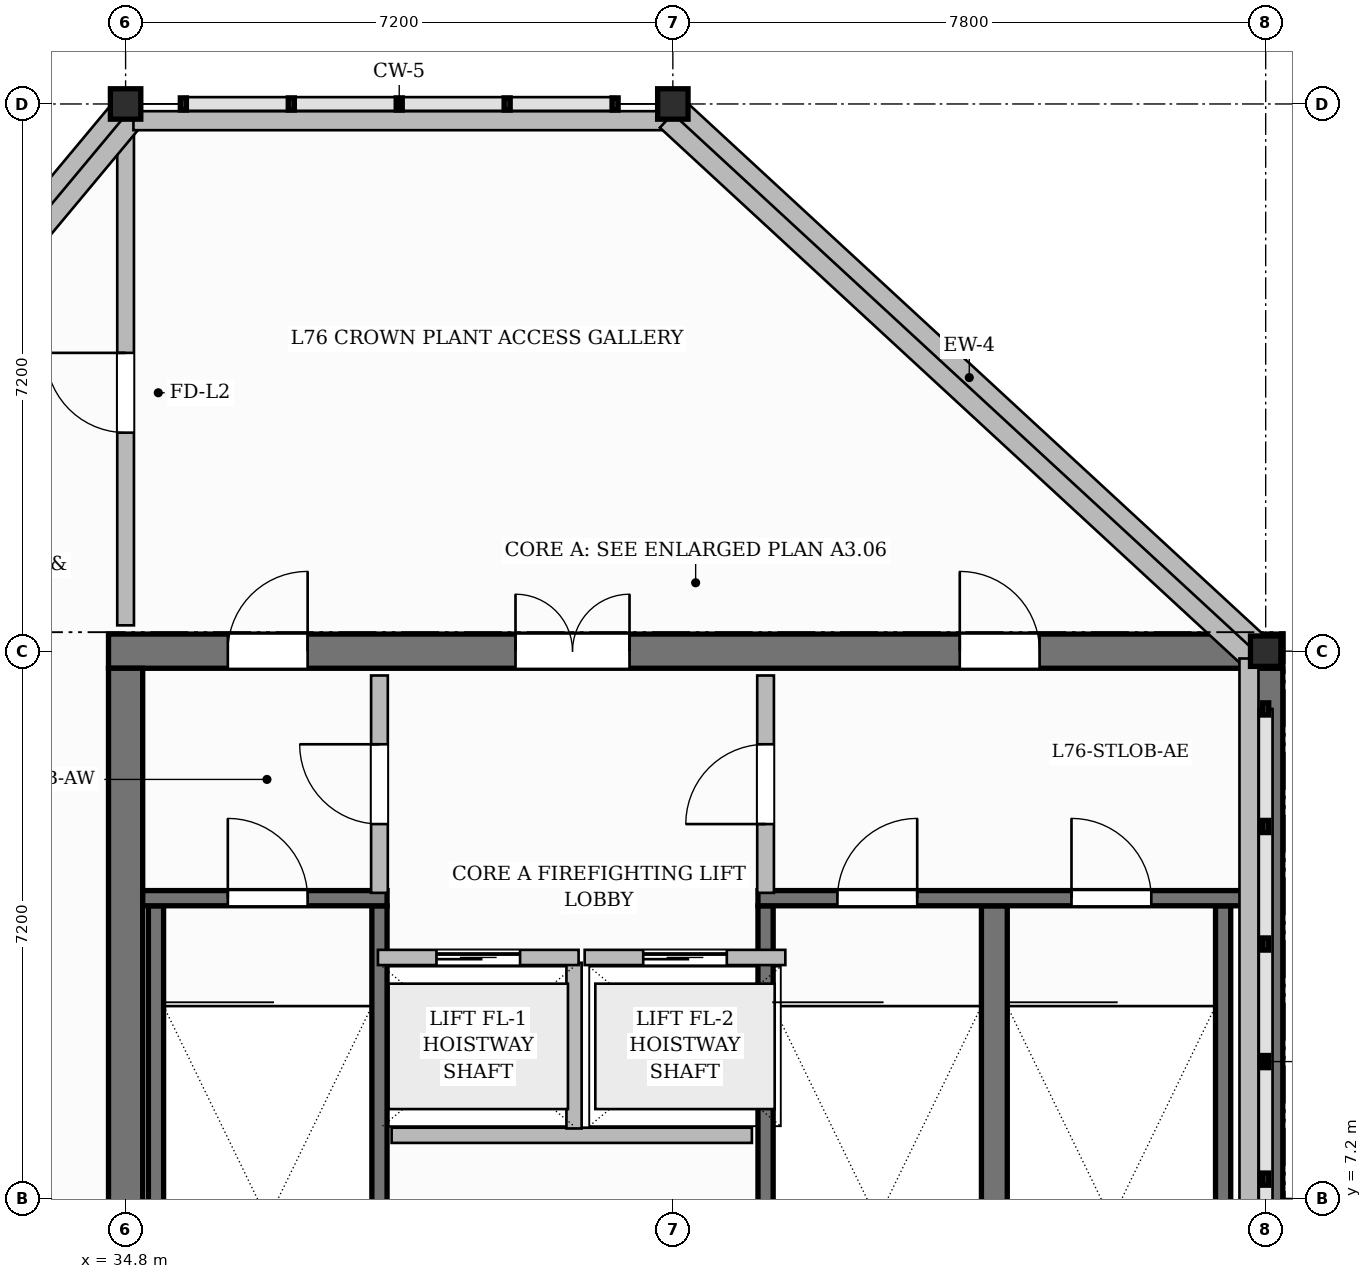
"""IFC4 building model, lengths in metres.
Left out: names, types, materials, properties, quantities, classifications, styles, units other than length and angle.
Written with IfcOpenShell. Run it as: python <this file> out.ifc"""

import sys

from ifc_helpers import new_model, si_unit, direction, frame, frame_2d, origin, origin_2d, place, context, subcontext, project, spatial, rectangle, hollow_rectangle, extrude, source, transform, mapped, element, fill, save


model = new_model("IFC4")
c1 = context("Model", 3, precision=1e-05, world=origin(), true_north=direction((0.0, 1.0)))
c2 = subcontext(c1, "Body", "Model", "MODEL_VIEW")
j1 = project(units=[si_unit("LENGTHUNIT", "METRE"), si_unit("PLANEANGLEUNIT", "RADIAN")], contexts=[c1])
p1 = place(None, origin())
s1 = spatial("IfcSite", under=j1, at=p1, CompositionType="ELEMENT")
p2 = place(p1, origin())
s2 = spatial("IfcBuilding", under=s1, at=p2, CompositionType="ELEMENT")
p3 = place(p2, frame((0.0, 0.0, 303.9)))
s3 = spatial("IfcBuildingStorey", under=s2, at=p3, CompositionType="ELEMENT", Elevation=303.9)
p4 = place(p3, frame((34.575, 14.4, 0.0), z_axis=(0.0, 0.0, 1.0), x_axis=(1.0, 0.0, 0.0)))
e1 = element("IfcWall", 1, at=p4, inside=s3, PredefinedType="SHEAR", context=c2, shape_type="SweptSolid", body=[
    extrude(rectangle(XDim=15.45, YDim=0.45, at=frame_2d((7.725, 0.0))), origin(), (0.0, 0.0, 1.0), 4.8),
])
p5 = place(p4, frame((5.355, 0.0, 0.0)))
e2 = element("IfcOpeningElement", 2, at=p5, cuts=e1, PredefinedType="OPENING", context=c2, shape_type="SweptSolid", body=[
    extrude(rectangle(XDim=1.5, YDim=2.2, at=frame_2d((0.75, 1.1))), frame((0.0, 0.235, 0.0), z_axis=(0.0, -1.0, 0.0), x_axis=(1.0, 0.0, 0.0)), (0.0, 0.0, 1.0), 0.47),
])
p6 = place(p4, frame((1.57, 0.0, 0.0)))
e3 = element("IfcOpeningElement", 3, at=p6, cuts=e1, PredefinedType="OPENING", context=c2, shape_type="SweptSolid", body=[
    extrude(rectangle(XDim=1.05, YDim=2.15, at=frame_2d((0.525, 1.075))), frame((0.0, 0.235, 0.0), z_axis=(0.0, -1.0, 0.0), x_axis=(1.0, 0.0, 0.0)), (0.0, 0.0, 1.0), 0.47),
])
p7 = place(p4, frame((11.2, 0.0, 0.0)))
e4 = element("IfcOpeningElement", 4, at=p7, cuts=e1, PredefinedType="OPENING", context=c2, shape_type="SweptSolid", body=[
    extrude(rectangle(XDim=1.05, YDim=2.15, at=frame_2d((0.525, 1.075))), frame((0.0, 0.235, 0.0), z_axis=(0.0, -1.0, 0.0), x_axis=(1.0, 0.0, 0.0)), (0.0, 0.0, 1.0), 0.47),
])
for number, where, z_axis, x_axis in (
    (5, (34.8, 3.825, 0.0), (0.0, 0.0, 1.0), (0.0, 1.0, 0.0)),
    (6, (49.8, 3.825, 0.0), (0.0, 0.0, 1.0), (0.0, 1.0, 0.0)),
):
    element("IfcWall", number, at=place(p3, frame(where, z_axis=z_axis, x_axis=x_axis)), inside=s3, PredefinedType="SHEAR", context=c2, shape_type="SweptSolid", body=[
        extrude(rectangle(XDim=10.35, YDim=0.45, at=frame_2d((5.175, 0.0))), origin(), (0.0, 0.0, 1.0), 4.8),
    ])
m1 = source(origin(), c2, "Body", "SweptSolid", [
    extrude(hollow_rectangle(XDim=0.4, YDim=0.4, WallThickness=0.02, at=origin_2d()), origin(), (0.0, 0.0, 1.0), 4.8),
])
for number, where, z_axis, x_axis in (
    (7, (49.8, 14.4, 0.0), (0.0, 0.0, 1.0), (1.0, 0.0, 0.0)),
    (8, (42.0, 21.6, 0.0), (0.0, 0.0, 1.0), (1.0, 0.0, 0.0)),
    (9, (34.8, 21.6, 0.0), (0.0, 0.0, 1.0), (1.0, 0.0, 0.0)),
):
    element("IfcColumn", number, at=place(p3, frame(where, z_axis=z_axis, x_axis=x_axis)), inside=s3, PredefinedType="COLUMN", context=c2, shape_type="MappedRepresentation", body=[
        mapped(m1, transform((0.0, 0.0, 0.0), scale=1.0)),
    ])
for number, where, z_axis, x_axis in (
    (10, (35.2, 4.1, 0.0), (0.0, 0.0, 1.0), (0.0, 1.0, 0.0)),
    (11, (38.14, 4.1, 0.0), (0.0, 0.0, 1.0), (0.0, 1.0, 0.0)),
):
    element("IfcWall", number, at=place(p3, frame(where, z_axis=z_axis, x_axis=x_axis)), inside=s3, PredefinedType="SHEAR", context=c2, shape_type="SweptSolid", body=[
        extrude(rectangle(XDim=6.95, YDim=0.2, at=frame_2d((3.475, 0.0))), origin(), (0.0, 0.0, 1.0), 4.8),
    ])
p8 = place(p3, frame((35.025, 11.15, 0.0), z_axis=(0.0, 0.0, 1.0), x_axis=(1.0, 0.0, 0.0)))
e12 = element("IfcWall", 12, at=p8, inside=s3, PredefinedType="SHEAR", context=c2, shape_type="SweptSolid", body=[
    extrude(rectangle(XDim=3.215, YDim=0.2, at=frame_2d((1.607, 0.0))), origin(), (0.0, 0.0, 1.0), 4.8),
])
p9 = place(p8, frame((1.12, 0.0, 0.0)))
e13 = element("IfcOpeningElement", 13, at=p9, cuts=e12, PredefinedType="OPENING", context=c2, shape_type="SweptSolid", body=[
    extrude(rectangle(XDim=1.05, YDim=2.2, at=frame_2d((0.525, 1.1))), frame((0.0, 0.11, 0.0), z_axis=(0.0, -1.0, 0.0), x_axis=(1.0, 0.0, 0.0)), (0.0, 0.0, 1.0), 0.22),
])
p10 = place(p3, frame((43.22, 4.1, 0.0), z_axis=(0.0, 0.0, 1.0), x_axis=(0.0, 1.0, 0.0)))
e14 = element("IfcWall", 14, at=p10, inside=s3, PredefinedType="SHEAR", context=c2, shape_type="SweptSolid", body=[
    extrude(rectangle(XDim=6.95, YDim=0.2, at=frame_2d((3.475, 0.0))), origin(), (0.0, 0.0, 1.0), 4.8),
])
p11 = place(p3, frame((46.23, 4.1, 0.0), z_axis=(0.0, 0.0, 1.0), x_axis=(0.0, 1.0, 0.0)))
e15 = element("IfcWall", 15, at=p11, inside=s3, PredefinedType="SHEAR", context=c2, shape_type="SweptSolid", body=[
    extrude(rectangle(XDim=6.95, YDim=0.34, at=frame_2d((3.475, 0.0))), origin(), (0.0, 0.0, 1.0), 4.8),
])
p12 = place(p3, frame((49.24, 4.1, 0.0), z_axis=(0.0, 0.0, 1.0), x_axis=(0.0, 1.0, 0.0)))
e16 = element("IfcWall", 16, at=p12, inside=s3, PredefinedType="SHEAR", context=c2, shape_type="SweptSolid", body=[
    extrude(rectangle(XDim=6.95, YDim=0.2, at=frame_2d((3.475, 0.0))), origin(), (0.0, 0.0, 1.0), 4.8),
])
p13 = place(p3, frame((43.12, 11.15, 0.0), z_axis=(0.0, 0.0, 1.0), x_axis=(1.0, 0.0, 0.0)))
e17 = element("IfcWall", 17, at=p13, inside=s3, PredefinedType="SHEAR", context=c2, shape_type="SweptSolid", body=[
    extrude(rectangle(XDim=6.455, YDim=0.2, at=frame_2d((3.228, 0.0))), origin(), (0.0, 0.0, 1.0), 4.8),
])
p14 = place(p13, frame((1.045, 0.0, 0.0)))
e18 = element("IfcOpeningElement", 18, at=p14, cuts=e17, PredefinedType="OPENING", context=c2, shape_type="SweptSolid", body=[
    extrude(rectangle(XDim=1.05, YDim=2.2, at=frame_2d((0.525, 1.1))), frame((0.0, 0.11, 0.0), z_axis=(0.0, -1.0, 0.0), x_axis=(1.0, 0.0, 0.0)), (0.0, 0.0, 1.0), 0.22),
])
p15 = place(p13, frame((4.125, 0.0, 0.0)))
e19 = element("IfcOpeningElement", 19, at=p15, cuts=e17, PredefinedType="OPENING", context=c2, shape_type="SweptSolid", body=[
    extrude(rectangle(XDim=1.05, YDim=2.2, at=frame_2d((0.525, 1.1))), frame((0.0, 0.11, 0.0), z_axis=(0.0, -1.0, 0.0), x_axis=(1.0, 0.0, 0.0)), (0.0, 0.0, 1.0), 0.22),
])
p16 = place(p3, frame((38.3, 8.03, 0.0), z_axis=(0.0, 0.0, 1.0), x_axis=(1.0, 0.0, 0.0)))
e20 = element("IfcWall", 20, at=p16, inside=s3, PredefinedType="PARTITIONING", context=c2, shape_type="SweptSolid", body=[
    extrude(rectangle(XDim=4.74, YDim=0.2, at=frame_2d((2.37, 0.0))), origin(), (0.0, 0.0, 1.0), 4.5),
])
p17 = place(p3, frame((40.7, 8.12, 0.0), z_axis=(0.0, 0.0, 1.0), x_axis=(0.0, 1.0, 0.0)))
e21 = element("IfcWall", 21, at=p17, inside=s3, PredefinedType="PARTITIONING", context=c2, shape_type="SweptSolid", body=[
    extrude(rectangle(XDim=2.18, YDim=0.2, at=frame_2d((1.09, 0.0))), origin(), (0.0, 0.0, 1.0), 4.5),
])
p18 = place(p3, frame((38.14, 11.22, 0.0), z_axis=(0.0, 0.0, 1.0), x_axis=(0.0, 1.0, 0.0)))
e22 = element("IfcWall", 22, at=p18, inside=s3, PredefinedType="PARTITIONING", context=c2, shape_type="SweptSolid", body=[
    extrude(rectangle(XDim=2.86, YDim=0.22, at=frame_2d((1.43, 0.0))), origin(), (0.0, 0.0, 1.0), 4.5),
])
p19 = place(p18, frame((0.905, 0.0, 0.0)))
e23 = element("IfcOpeningElement", 23, at=p19, cuts=e22, PredefinedType="OPENING", context=c2, shape_type="SweptSolid", body=[
    extrude(rectangle(XDim=1.05, YDim=2.15, at=frame_2d((0.525, 1.075))), frame((0.0, 0.12, 0.0), z_axis=(0.0, -1.0, 0.0), x_axis=(1.0, 0.0, 0.0)), (0.0, 0.0, 1.0), 0.24),
])
p20 = place(p3, frame((43.22, 11.22, 0.0), z_axis=(0.0, 0.0, 1.0), x_axis=(0.0, 1.0, 0.0)))
e24 = element("IfcWall", 24, at=p20, inside=s3, PredefinedType="PARTITIONING", context=c2, shape_type="SweptSolid", body=[
    extrude(rectangle(XDim=2.86, YDim=0.22, at=frame_2d((1.43, 0.0))), origin(), (0.0, 0.0, 1.0), 4.5),
])
p21 = place(p20, frame((0.905, 0.0, 0.0)))
e25 = element("IfcOpeningElement", 25, at=p21, cuts=e24, PredefinedType="OPENING", context=c2, shape_type="SweptSolid", body=[
    extrude(rectangle(XDim=1.05, YDim=2.15, at=frame_2d((0.525, 1.075))), frame((0.0, 0.12, 0.0), z_axis=(0.0, -1.0, 0.0), x_axis=(1.0, 0.0, 0.0)), (0.0, 0.0, 1.0), 0.24),
])
p22 = place(p3, frame((34.8, 14.74, 0.0), z_axis=(0.0, 0.0, 1.0), x_axis=(0.0, 1.0, 0.0)))
e26 = element("IfcWall", 26, at=p22, inside=s3, PredefinedType="PARTITIONING", context=c2, shape_type="SweptSolid", body=[
    extrude(rectangle(XDim=6.72, YDim=0.22, at=frame_2d((3.36, 0.0))), origin(), (0.0, 0.0, 1.0), 4.035),
])
p23 = place(p22, frame((2.535, 0.0, 0.0)))
e27 = element("IfcOpeningElement", 27, at=p23, cuts=e26, PredefinedType="OPENING", context=c2, shape_type="SweptSolid", body=[
    extrude(rectangle(XDim=1.05, YDim=2.15, at=frame_2d((0.525, 1.075))), frame((0.0, 0.12, 0.0), z_axis=(0.0, -1.0, 0.0), x_axis=(1.0, 0.0, 0.0)), (0.0, 0.0, 1.0), 0.24),
])
p24 = place(p3, frame((38.12, 10.37, 0.0), z_axis=(0.0, 0.0, 1.0), x_axis=(1.0, 0.0, 0.0)))
e28 = element("IfcWall", 28, at=p24, inside=s3, PredefinedType="PARTITIONING", context=c2, shape_type="SweptSolid", body=[
    extrude(rectangle(XDim=2.64, YDim=0.2, at=frame_2d((1.32, 0.0))), origin(), (0.0, 0.0, 1.0), 4.5),
])
p25 = place(p24, frame((0.77, 0.0, 0.0)))
e29 = element("IfcOpeningElement", 29, at=p25, cuts=e28, PredefinedType="OPENING", context=c2, shape_type="SweptSolid", body=[
    extrude(rectangle(XDim=1.1, YDim=2.2, at=frame_2d((0.55, 1.1))), frame((0.0, 0.11, 0.0), z_axis=(0.0, -1.0, 0.0), x_axis=(1.0, 0.0, 0.0)), (0.0, 0.0, 1.0), 0.22),
])
p26 = place(p3, frame((40.84, 10.37, 0.0), z_axis=(0.0, 0.0, 1.0), x_axis=(1.0, 0.0, 0.0)))
e30 = element("IfcWall", 30, at=p26, inside=s3, PredefinedType="PARTITIONING", context=c2, shape_type="SweptSolid", body=[
    extrude(rectangle(XDim=2.64, YDim=0.2, at=frame_2d((1.32, 0.0))), origin(), (0.0, 0.0, 1.0), 4.5),
])
p27 = place(p26, frame((0.77, 0.0, 0.0)))
e31 = element("IfcOpeningElement", 31, at=p27, cuts=e30, PredefinedType="OPENING", context=c2, shape_type="SweptSolid", body=[
    extrude(rectangle(XDim=1.1, YDim=2.2, at=frame_2d((0.55, 1.1))), frame((0.0, 0.11, 0.0), z_axis=(0.0, -1.0, 0.0), x_axis=(1.0, 0.0, 0.0)), (0.0, 0.0, 1.0), 0.22),
])
p28 = place(p3, frame((49.8, 14.4, 0.0), z_axis=(0.0, 0.0, 1.0), x_axis=(-0.734796390569, 0.678287744551, 0.0)))
e32 = element("IfcWall", 32, at=p28, inside=s3, PredefinedType="SOLIDWALL", context=c2, shape_type="SweptSolid", body=[
    extrude(rectangle(XDim=10.615, YDim=0.28, at=frame_2d((5.308, 0.0))), origin(), (0.0, 0.0, 1.0), 4.125),
])
p29 = place(p3, frame((34.8, 21.6, 0.0), z_axis=(0.0, 0.0, 1.0), x_axis=(-0.640174150918, -0.768229820104, 0.0)))
e33 = element("IfcWall", 33, at=p29, inside=s3, PredefinedType="SOLIDWALL", context=c2, shape_type="SweptSolid", body=[
    extrude(rectangle(XDim=9.373, YDim=0.28, at=frame_2d((4.686, 0.0))), origin(), (0.0, 0.0, 1.0), 4.125),
])
p30 = place(p3, frame((28.8, 7.2, 0.0), z_axis=(0.0, 0.0, 1.0), x_axis=(0.640186961885, -0.768219144407, 0.0)))
e34 = element("IfcWall", 34, at=p30, inside=s3, PredefinedType="SOLIDWALL", context=c2, shape_type="SweptSolid", body=[
    extrude(rectangle(XDim=9.372, YDim=0.28, at=frame_2d((4.686, 0.0))), origin(), (0.0, 0.0, 1.0), 4.125),
])
p31 = place(p3, frame((34.903, 0.22, 4.8), z_axis=(0.0, 0.0, 1.0), x_axis=(-0.640176560292, 0.76822781234, 0.0)))
e35 = element("IfcWall", 35, at=p31, inside=s3, PredefinedType="PARAPET", context=c2, shape_type="SweptSolid", body=[
    extrude(rectangle(XDim=9.19, YDim=0.25, at=frame_2d((4.595, 0.0))), origin(), (0.0, 0.0, 1.0), 0.95),
])
p32 = place(p3, frame((29.02, 14.32, 4.8), z_axis=(0.0, 0.0, 1.0), x_axis=(0.640189625983, 0.768216924302, 0.0)))
e36 = element("IfcWall", 36, at=p32, inside=s3, PredefinedType="PARAPET", context=c2, shape_type="SweptSolid", body=[
    extrude(rectangle(XDim=9.189, YDim=0.25, at=frame_2d((4.595, 0.0))), origin(), (0.0, 0.0, 1.0), 0.95),
])
p33 = place(p3, frame((34.903, 21.38, 4.8), z_axis=(0.0, 0.0, 1.0), x_axis=(1.0, 0.0, 0.0)))
e37 = element("IfcWall", 37, at=p33, inside=s3, PredefinedType="PARAPET", context=c2, shape_type="SweptSolid", body=[
    extrude(rectangle(XDim=7.011, YDim=0.25, at=frame_2d((3.505, 0.0))), origin(), (0.0, 0.0, 1.0), 0.95),
])
p34 = place(p3, frame((41.914, 21.38, 4.8), z_axis=(0.0, 0.0, 1.0), x_axis=(0.734810622078, -0.67827232708, 0.0)))
e38 = element("IfcWall", 38, at=p34, inside=s3, PredefinedType="PARAPET", context=c2, shape_type="SweptSolid", body=[
    extrude(rectangle(XDim=10.433, YDim=0.25, at=frame_2d((5.216, 0.0))), origin(), (0.0, 0.0, 1.0), 0.95),
])
p35 = place(p3, frame((49.58, 14.304, 4.8), z_axis=(0.0, 0.0, 1.0), x_axis=(0.0, -1.0, 0.0)))
e39 = element("IfcWall", 39, at=p35, inside=s3, PredefinedType="PARAPET", context=c2, shape_type="SweptSolid", body=[
    extrude(rectangle(XDim=10.563, YDim=0.25, at=frame_2d((5.281, 0.0))), origin(), (0.0, 0.0, 1.0), 0.95),
])
m2 = source(origin(), c2, "Body", "SweptSolid", [
    extrude(rectangle(XDim=1.05, YDim=2.2, at=frame_2d((0.525, 1.1))), frame((0.0, 0.025, 0.0), z_axis=(0.0, -1.0, 0.0), x_axis=(1.0, 0.0, 0.0)), (0.0, 0.0, 1.0), 0.05),
])
p36 = place(p9, origin())
e40 = element("IfcDoor", 40, at=p36, inside=s3, OperationType="SINGLE_SWING_LEFT", PredefinedType="DOOR", context=c2, shape_type="MappedRepresentation", body=[
    mapped(m2, transform((0.0, 0.0, 0.0), scale=1.0)),
])
fill(e13, e40)
p37 = place(p14, origin())
e41 = element("IfcDoor", 41, at=p37, inside=s3, OperationType="SINGLE_SWING_RIGHT", PredefinedType="DOOR", context=c2, shape_type="MappedRepresentation", body=[
    mapped(m2, transform((0.0, 0.0, 0.0), scale=1.0)),
])
fill(e18, e41)
p38 = place(p15, origin())
e42 = element("IfcDoor", 42, at=p38, inside=s3, OperationType="SINGLE_SWING_LEFT", PredefinedType="DOOR", context=c2, shape_type="MappedRepresentation", body=[
    mapped(m2, transform((0.0, 0.0, 0.0), scale=1.0)),
])
fill(e19, e42)
m3 = source(origin(), c2, "Body", "SweptSolid", [
    extrude(rectangle(XDim=1.05, YDim=2.15, at=frame_2d((0.525, 1.075))), frame((0.0, 0.025, 0.0), z_axis=(0.0, -1.0, 0.0), x_axis=(1.0, 0.0, 0.0)), (0.0, 0.0, 1.0), 0.05),
])
p39 = place(p19, origin())
e43 = element("IfcDoor", 43, at=p39, inside=s3, OperationType="SINGLE_SWING_RIGHT", PredefinedType="DOOR", context=c2, shape_type="MappedRepresentation", body=[
    mapped(m3, transform((0.0, 0.0, 0.0), scale=1.0)),
])
fill(e23, e43)
p40 = place(p21, origin())
e44 = element("IfcDoor", 44, at=p40, inside=s3, OperationType="SINGLE_SWING_LEFT", PredefinedType="DOOR", context=c2, shape_type="MappedRepresentation", body=[
    mapped(m3, transform((0.0, 0.0, 0.0), scale=1.0)),
])
fill(e25, e44)
m4 = source(origin(), c2, "Body", "SweptSolid", [
    extrude(rectangle(XDim=1.5, YDim=2.2, at=frame_2d((0.75, 1.1))), frame((0.0, 0.025, 0.0), z_axis=(0.0, -1.0, 0.0), x_axis=(1.0, 0.0, 0.0)), (0.0, 0.0, 1.0), 0.05),
])
p41 = place(p5, origin())
e45 = element("IfcDoor", 45, at=p41, inside=s3, OperationType="DOUBLE_DOOR_SINGLE_SWING", PredefinedType="DOOR", context=c2, shape_type="MappedRepresentation", body=[
    mapped(m4, transform((0.0, 0.0, 0.0), scale=1.0)),
])
fill(e2, e45)
p42 = place(p6, origin())
e46 = element("IfcDoor", 46, at=p42, inside=s3, OperationType="SINGLE_SWING_RIGHT", PredefinedType="DOOR", context=c2, shape_type="MappedRepresentation", body=[
    mapped(m3, transform((0.0, 0.0, 0.0), scale=1.0)),
])
fill(e3, e46)
p43 = place(p7, origin())
e47 = element("IfcDoor", 47, at=p43, inside=s3, OperationType="SINGLE_SWING_LEFT", PredefinedType="DOOR", context=c2, shape_type="MappedRepresentation", body=[
    mapped(m3, transform((0.0, 0.0, 0.0), scale=1.0)),
])
fill(e4, e47)
p44 = place(p23, origin())
e48 = element("IfcDoor", 48, at=p44, inside=s3, OperationType="SINGLE_SWING_RIGHT", PredefinedType="DOOR", context=c2, shape_type="MappedRepresentation", body=[
    mapped(m3, transform((0.0, 0.0, 0.0), scale=1.0)),
])
fill(e27, e48)
m5 = source(origin(), c2, "Body", "SweptSolid", [
    extrude(rectangle(XDim=1.1, YDim=2.2, at=frame_2d((0.55, 1.1))), frame((0.0, 0.025, 0.0), z_axis=(0.0, -1.0, 0.0), x_axis=(1.0, 0.0, 0.0)), (0.0, 0.0, 1.0), 0.05),
])
p45 = place(p25, origin())
e49 = element("IfcDoor", 49, at=p45, inside=s3, OperationType="SLIDING_TO_LEFT", PredefinedType="DOOR", context=c2, shape_type="MappedRepresentation", body=[
    mapped(m5, transform((0.0, 0.0, 0.0), scale=1.0)),
])
fill(e29, e49)
p46 = place(p27, origin())
e50 = element("IfcDoor", 50, at=p46, inside=s3, OperationType="SLIDING_TO_LEFT", PredefinedType="DOOR", context=c2, shape_type="MappedRepresentation", body=[
    mapped(m5, transform((0.0, 0.0, 0.0), scale=1.0)),
])
fill(e31, e50)
save(model, sys.argv[1])
